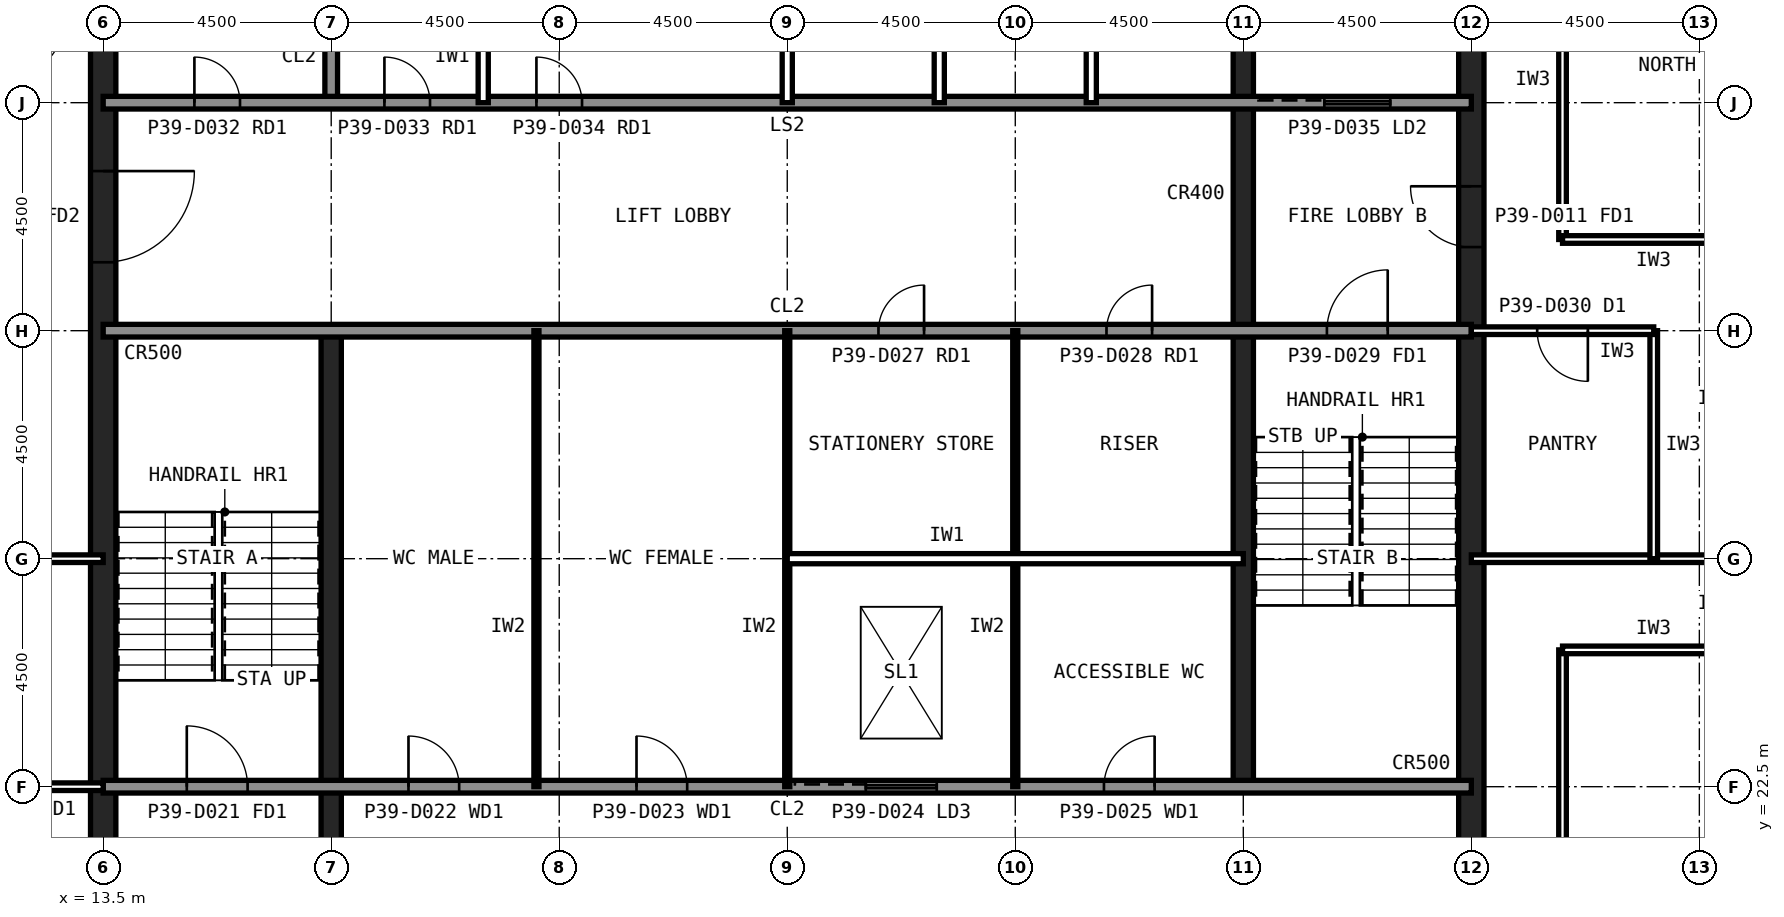
"""IFC4 building model, lengths in metres.
Left out: names, types, materials, properties, quantities, classifications, styles, units other than length and angle.
Written with IfcOpenShell. Run it as: python <this file> out.ifc"""

import sys

from ifc_helpers import new_model, si_unit, direction, frame, frame_2d, origin, place, context, subcontext, project, spatial, rectangle, extrude, element, fill, save


model = new_model("IFC4")
c1 = context("Model", 3, precision=1e-05, world=origin(), true_north=direction((0.0, 1.0)))
c2 = subcontext(c1, "Body", "Model", "MODEL_VIEW")
j1 = project(units=[si_unit("LENGTHUNIT", "METRE"), si_unit("PLANEANGLEUNIT", "RADIAN")], contexts=[c1])
p1 = place(None, origin())
s1 = spatial("IfcSite", under=j1, at=p1, CompositionType="ELEMENT")
p2 = place(p1, origin())
s2 = spatial("IfcBuilding", under=s1, at=p2, CompositionType="ELEMENT")
p3 = place(p2, frame((0.0, 0.0, 167.6)))
s3 = spatial("IfcBuildingStorey", under=s2, at=p3, CompositionType="ELEMENT", Elevation=167.6)
p4 = place(p3, frame((40.5, 13.5, 0.0), z_axis=(0.0, 0.0, 1.0), x_axis=(0.0, 1.0, 0.0)))
e1 = element("IfcWall", 1, at=p4, inside=s3, PredefinedType="SHEAR", context=c2, shape_type="SweptSolid", body=[
    extrude(rectangle(XDim=27.0, YDim=0.5, at=frame_2d((13.5, 0.0))), origin(), (0.0, 0.0, 1.0), 4.0),
])
p5 = place(p4, frame((5.85, 0.0, 0.0)))
e2 = element("IfcOpeningElement", 2, at=p5, cuts=e1, PredefinedType="OPENING", context=c2, shape_type="SweptSolid", body=[
    extrude(rectangle(XDim=1.8, YDim=2.1, at=frame_2d((0.9, 1.05))), frame((0.0, 0.26, 0.0), z_axis=(0.0, -1.0, 0.0), x_axis=(1.0, 0.0, 0.0)), (0.0, 0.0, 1.0), 0.52),
])
p6 = place(p4, frame((19.65, 0.0, 0.0)))
e3 = element("IfcOpeningElement", 3, at=p6, cuts=e1, PredefinedType="OPENING", context=c2, shape_type="SweptSolid", body=[
    extrude(rectangle(XDim=1.2, YDim=2.1, at=frame_2d((0.6, 1.05))), frame((0.0, 0.26, 0.0), z_axis=(0.0, -1.0, 0.0), x_axis=(1.0, 0.0, 0.0)), (0.0, 0.0, 1.0), 0.52),
])
p7 = place(p3, frame((13.5, 40.5, 0.0), z_axis=(0.0, 0.0, 1.0), x_axis=(0.0, -1.0, 0.0)))
e4 = element("IfcWall", 4, at=p7, inside=s3, PredefinedType="SHEAR", context=c2, shape_type="SweptSolid", body=[
    extrude(rectangle(XDim=27.0, YDim=0.5, at=frame_2d((13.5, 0.0))), origin(), (0.0, 0.0, 1.0), 4.0),
])
p8 = place(p7, frame((19.65, 0.0, 0.0)))
e5 = element("IfcOpeningElement", 5, at=p8, cuts=e4, PredefinedType="OPENING", context=c2, shape_type="SweptSolid", body=[
    extrude(rectangle(XDim=1.2, YDim=2.1, at=frame_2d((0.6, 1.05))), frame((0.0, 0.26, 0.0), z_axis=(0.0, -1.0, 0.0), x_axis=(1.0, 0.0, 0.0)), (0.0, 0.0, 1.0), 0.52),
])
p9 = place(p7, frame((5.85, 0.0, 0.0)))
e6 = element("IfcOpeningElement", 6, at=p9, cuts=e4, PredefinedType="OPENING", context=c2, shape_type="SweptSolid", body=[
    extrude(rectangle(XDim=1.8, YDim=2.1, at=frame_2d((0.9, 1.05))), frame((0.0, 0.26, 0.0), z_axis=(0.0, -1.0, 0.0), x_axis=(1.0, 0.0, 0.0)), (0.0, 0.0, 1.0), 0.52),
])
p10 = place(p3, frame((18.0, 13.5, 0.0), z_axis=(0.0, 0.0, 1.0), x_axis=(0.0, 1.0, 0.0)))
e7 = element("IfcWall", 7, at=p10, inside=s3, PredefinedType="SHEAR", context=c2, shape_type="SweptSolid", body=[
    extrude(rectangle(XDim=18.0, YDim=0.4, at=frame_2d((9.0, 0.0))), origin(), (0.0, 0.0, 1.0), 4.0),
])
p11 = place(p3, frame((18.0, 36.0, 0.0), z_axis=(0.0, 0.0, 1.0), x_axis=(0.0, 1.0, 0.0)))
e8 = element("IfcWall", 8, at=p11, inside=s3, PredefinedType="SOLIDWALL", context=c2, shape_type="SweptSolid", body=[
    extrude(rectangle(XDim=4.5, YDim=0.25, at=frame_2d((2.25, 0.0))), origin(), (0.0, 0.0, 1.0), 3.84),
])
p12 = place(p3, frame((36.0, 22.5, 0.0), z_axis=(0.0, 0.0, 1.0), x_axis=(0.0, 1.0, 0.0)))
e9 = element("IfcWall", 9, at=p12, inside=s3, PredefinedType="SHEAR", context=c2, shape_type="SweptSolid", body=[
    extrude(rectangle(XDim=18.0, YDim=0.4, at=frame_2d((9.0, 0.0))), origin(), (0.0, 0.0, 1.0), 4.0),
])
p13 = place(p3, frame((13.5, 36.0, 0.0), z_axis=(0.0, 0.0, 1.0), x_axis=(1.0, 0.0, 0.0)))
e10 = element("IfcWall", 10, at=p13, inside=s3, PredefinedType="SOLIDWALL", context=c2, shape_type="SweptSolid", body=[
    extrude(rectangle(XDim=27.0, YDim=0.25, at=frame_2d((13.5, 0.0))), origin(), (0.0, 0.0, 1.0), 3.84),
])
p14 = place(p13, frame((1.8, 0.0, 0.0)))
e11 = element("IfcOpeningElement", 11, at=p14, cuts=e10, PredefinedType="OPENING", context=c2, shape_type="SweptSolid", body=[
    extrude(rectangle(XDim=0.9, YDim=2.1, at=frame_2d((0.45, 1.05))), frame((0.0, 0.135, 0.0), z_axis=(0.0, -1.0, 0.0), x_axis=(1.0, 0.0, 0.0)), (0.0, 0.0, 1.0), 0.27),
])
p15 = place(p13, frame((5.55, 0.0, 0.0)))
e12 = element("IfcOpeningElement", 12, at=p15, cuts=e10, PredefinedType="OPENING", context=c2, shape_type="SweptSolid", body=[
    extrude(rectangle(XDim=0.9, YDim=2.1, at=frame_2d((0.45, 1.05))), frame((0.0, 0.135, 0.0), z_axis=(0.0, -1.0, 0.0), x_axis=(1.0, 0.0, 0.0)), (0.0, 0.0, 1.0), 0.27),
])
p16 = place(p13, frame((8.55, 0.0, 0.0)))
e13 = element("IfcOpeningElement", 13, at=p16, cuts=e10, PredefinedType="OPENING", context=c2, shape_type="SweptSolid", body=[
    extrude(rectangle(XDim=0.9, YDim=2.1, at=frame_2d((0.45, 1.05))), frame((0.0, 0.135, 0.0), z_axis=(0.0, -1.0, 0.0), x_axis=(1.0, 0.0, 0.0)), (0.0, 0.0, 1.0), 0.27),
])
p17 = place(p13, frame((24.1, 0.0, 0.0)))
e14 = element("IfcOpeningElement", 14, at=p17, cuts=e10, PredefinedType="OPENING", context=c2, shape_type="SweptSolid", body=[
    extrude(rectangle(XDim=1.3, YDim=2.2, at=frame_2d((0.65, 1.1))), frame((0.0, 0.135, 0.0), z_axis=(0.0, -1.0, 0.0), x_axis=(1.0, 0.0, 0.0)), (0.0, 0.0, 1.0), 0.27),
])
p18 = place(p3, frame((13.5, 22.5, 0.0), z_axis=(0.0, 0.0, 1.0), x_axis=(1.0, 0.0, 0.0)))
e15 = element("IfcWall", 15, at=p18, inside=s3, PredefinedType="SOLIDWALL", context=c2, shape_type="SweptSolid", body=[
    extrude(rectangle(XDim=27.0, YDim=0.25, at=frame_2d((13.5, 0.0))), origin(), (0.0, 0.0, 1.0), 3.84),
])
p19 = place(p18, frame((1.65, 0.0, 0.0)))
e16 = element("IfcOpeningElement", 16, at=p19, cuts=e15, PredefinedType="OPENING", context=c2, shape_type="SweptSolid", body=[
    extrude(rectangle(XDim=1.2, YDim=2.1, at=frame_2d((0.6, 1.05))), frame((0.0, 0.135, 0.0), z_axis=(0.0, -1.0, 0.0), x_axis=(1.0, 0.0, 0.0)), (0.0, 0.0, 1.0), 0.27),
])
p20 = place(p18, frame((6.025, 0.0, 0.0)))
e17 = element("IfcOpeningElement", 17, at=p20, cuts=e15, PredefinedType="OPENING", context=c2, shape_type="SweptSolid", body=[
    extrude(rectangle(XDim=1.0, YDim=2.1, at=frame_2d((0.5, 1.05))), frame((0.0, 0.135, 0.0), z_axis=(0.0, -1.0, 0.0), x_axis=(1.0, 0.0, 0.0)), (0.0, 0.0, 1.0), 0.27),
])
p21 = place(p18, frame((10.525, 0.0, 0.0)))
e18 = element("IfcOpeningElement", 18, at=p21, cuts=e15, PredefinedType="OPENING", context=c2, shape_type="SweptSolid", body=[
    extrude(rectangle(XDim=1.0, YDim=2.1, at=frame_2d((0.5, 1.05))), frame((0.0, 0.135, 0.0), z_axis=(0.0, -1.0, 0.0), x_axis=(1.0, 0.0, 0.0)), (0.0, 0.0, 1.0), 0.27),
])
p22 = place(p18, frame((19.75, 0.0, 0.0)))
e19 = element("IfcOpeningElement", 19, at=p22, cuts=e15, PredefinedType="OPENING", context=c2, shape_type="SweptSolid", body=[
    extrude(rectangle(XDim=1.0, YDim=2.1, at=frame_2d((0.5, 1.05))), frame((0.0, 0.135, 0.0), z_axis=(0.0, -1.0, 0.0), x_axis=(1.0, 0.0, 0.0)), (0.0, 0.0, 1.0), 0.27),
])
p23 = place(p18, frame((15.05, 0.0, 0.0)))
e20 = element("IfcOpeningElement", 20, at=p23, cuts=e15, PredefinedType="OPENING", context=c2, shape_type="SweptSolid", body=[
    extrude(rectangle(XDim=1.4, YDim=2.4, at=frame_2d((0.7, 1.2))), frame((0.0, 0.135, 0.0), z_axis=(0.0, -1.0, 0.0), x_axis=(1.0, 0.0, 0.0)), (0.0, 0.0, 1.0), 0.27),
])
p24 = place(p3, frame((13.5, 31.5, 0.0), z_axis=(0.0, 0.0, 1.0), x_axis=(1.0, 0.0, 0.0)))
e21 = element("IfcWall", 21, at=p24, inside=s3, PredefinedType="SOLIDWALL", context=c2, shape_type="SweptSolid", body=[
    extrude(rectangle(XDim=27.0, YDim=0.25, at=frame_2d((13.5, 0.0))), origin(), (0.0, 0.0, 1.0), 3.84),
])
p25 = place(p24, frame((24.15, 0.0, 0.0)))
e22 = element("IfcOpeningElement", 22, at=p25, cuts=e21, PredefinedType="OPENING", context=c2, shape_type="SweptSolid", body=[
    extrude(rectangle(XDim=1.2, YDim=2.1, at=frame_2d((0.6, 1.05))), frame((0.0, 0.135, 0.0), z_axis=(0.0, -1.0, 0.0), x_axis=(1.0, 0.0, 0.0)), (0.0, 0.0, 1.0), 0.27),
])
p26 = place(p24, frame((15.3, 0.0, 0.0)))
e23 = element("IfcOpeningElement", 23, at=p26, cuts=e21, PredefinedType="OPENING", context=c2, shape_type="SweptSolid", body=[
    extrude(rectangle(XDim=0.9, YDim=2.1, at=frame_2d((0.45, 1.05))), frame((0.0, 0.135, 0.0), z_axis=(0.0, -1.0, 0.0), x_axis=(1.0, 0.0, 0.0)), (0.0, 0.0, 1.0), 0.27),
])
p27 = place(p24, frame((19.8, 0.0, 0.0)))
e24 = element("IfcOpeningElement", 24, at=p27, cuts=e21, PredefinedType="OPENING", context=c2, shape_type="SweptSolid", body=[
    extrude(rectangle(XDim=0.9, YDim=2.1, at=frame_2d((0.45, 1.05))), frame((0.0, 0.135, 0.0), z_axis=(0.0, -1.0, 0.0), x_axis=(1.0, 0.0, 0.0)), (0.0, 0.0, 1.0), 0.27),
])
for number, where, z_axis, x_axis in (
    (25, (21.0, 36.0, 0.0), (0.0, 0.0, 1.0), (0.0, 1.0, 0.0)),
    (26, (27.0, 36.0, 0.0), (0.0, 0.0, 1.0), (0.0, 1.0, 0.0)),
    (27, (30.0, 36.0, 0.0), (0.0, 0.0, 1.0), (0.0, 1.0, 0.0)),
    (28, (33.0, 36.0, 0.0), (0.0, 0.0, 1.0), (0.0, 1.0, 0.0)),
):
    element("IfcWall", number, at=place(p3, frame(where, z_axis=z_axis, x_axis=x_axis)), inside=s3, PredefinedType="PARTITIONING", context=c2, shape_type="SweptSolid", body=[
        extrude(rectangle(XDim=4.5, YDim=0.2, at=frame_2d((2.25, 0.0))), origin(), (0.0, 0.0, 1.0), 3.84),
    ])
for number, where, z_axis, x_axis in (
    (29, (22.05, 22.5, 0.0), (0.0, 0.0, 1.0), (0.0, 1.0, 0.0)),
    (30, (27.0, 22.5, 0.0), (0.0, 0.0, 1.0), (0.0, 1.0, 0.0)),
    (31, (31.5, 22.5, 0.0), (0.0, 0.0, 1.0), (0.0, 1.0, 0.0)),
):
    element("IfcWall", number, at=place(p3, frame(where, z_axis=z_axis, x_axis=x_axis)), inside=s3, PredefinedType="PLUMBINGWALL", context=c2, shape_type="SweptSolid", body=[
        extrude(rectangle(XDim=9.0, YDim=0.1, at=frame_2d((4.5, 0.0))), origin(), (0.0, 0.0, 1.0), 3.84),
    ])
p28 = place(p3, frame((27.0, 27.0, 0.0), z_axis=(0.0, 0.0, 1.0), x_axis=(1.0, 0.0, 0.0)))
e32 = element("IfcWall", 32, at=p28, inside=s3, PredefinedType="PARTITIONING", context=c2, shape_type="SweptSolid", body=[
    extrude(rectangle(XDim=9.0, YDim=0.2, at=frame_2d((4.5, 0.0))), origin(), (0.0, 0.0, 1.0), 3.84),
])
for number, where, z_axis, x_axis in (
    (33, (0.36, 27.0, 0.0), (0.0, 0.0, 1.0), (1.0, 0.0, 0.0)),
    (34, (40.5, 27.0, 0.0), (0.0, 0.0, 1.0), (1.0, 0.0, 0.0)),
):
    element("IfcWall", number, at=place(p3, frame(where, z_axis=z_axis, x_axis=x_axis)), inside=s3, PredefinedType="PARTITIONING", context=c2, shape_type="SweptSolid", body=[
        extrude(rectangle(XDim=13.14, YDim=0.15, at=frame_2d((6.57, 0.0))), origin(), (0.0, 0.0, 1.0), 2.989),
    ])
p29 = place(p3, frame((42.3, 33.3, 0.0), z_axis=(0.0, 0.0, 1.0), x_axis=(0.0, 1.0, 0.0)))
e35 = element("IfcWall", 35, at=p29, inside=s3, PredefinedType="PARTITIONING", context=c2, shape_type="SweptSolid", body=[
    extrude(rectangle(XDim=9.0, YDim=0.15, at=frame_2d((4.5, 0.0))), origin(), (0.0, 0.0, 1.0), 3.84),
])
p30 = place(p29, frame((4.0, 0.0, 0.0)))
e36 = element("IfcOpeningElement", 36, at=p30, cuts=e35, PredefinedType="OPENING", context=c2, shape_type="SweptSolid", body=[
    extrude(rectangle(XDim=1.0, YDim=2.1, at=frame_2d((0.5, 1.05))), frame((0.0, 0.085, 0.0), z_axis=(0.0, -1.0, 0.0), x_axis=(1.0, 0.0, 0.0)), (0.0, 0.0, 1.0), 0.17),
])
p31 = place(p3, frame((45.9, 33.3, 0.0), z_axis=(0.0, 0.0, 1.0), x_axis=(-1.0, 0.0, 0.0)))
e37 = element("IfcWall", 37, at=p31, inside=s3, PredefinedType="PARTITIONING", context=c2, shape_type="SweptSolid", body=[
    extrude(rectangle(XDim=3.6, YDim=0.15, at=frame_2d((1.8, 0.0))), origin(), (0.0, 0.0, 1.0), 3.84),
])
p32 = place(p3, frame((42.3, 4.95, 0.0), z_axis=(0.0, 0.0, 1.0), x_axis=(0.0, 1.0, 0.0)))
e38 = element("IfcWall", 38, at=p32, inside=s3, PredefinedType="PARTITIONING", context=c2, shape_type="SweptSolid", body=[
    extrude(rectangle(XDim=20.25, YDim=0.15, at=frame_2d((10.125, 0.0))), origin(), (0.0, 0.0, 1.0), 3.84),
])
p33 = place(p32, frame((9.625, 0.0, 0.0)))
e39 = element("IfcOpeningElement", 39, at=p33, cuts=e38, PredefinedType="OPENING", context=c2, shape_type="SweptSolid", body=[
    extrude(rectangle(XDim=1.0, YDim=2.1, at=frame_2d((0.5, 1.05))), frame((0.0, 0.085, 0.0), z_axis=(0.0, -1.0, 0.0), x_axis=(1.0, 0.0, 0.0)), (0.0, 0.0, 1.0), 0.17),
])
p34 = place(p3, frame((42.3, 25.2, 0.0), z_axis=(0.0, 0.0, 1.0), x_axis=(1.0, 0.0, 0.0)))
e40 = element("IfcWall", 40, at=p34, inside=s3, PredefinedType="PARTITIONING", context=c2, shape_type="SweptSolid", body=[
    extrude(rectangle(XDim=3.6, YDim=0.15, at=frame_2d((1.8, 0.0))), origin(), (0.0, 0.0, 1.0), 3.84),
])
p35 = place(p3, frame((44.1, 27.0, 0.0), z_axis=(0.0, 0.0, 1.0), x_axis=(0.0, 1.0, 0.0)))
e41 = element("IfcWall", 41, at=p35, inside=s3, PredefinedType="PARTITIONING", context=c2, shape_type="SweptSolid", body=[
    extrude(rectangle(XDim=4.5, YDim=0.15, at=frame_2d((2.25, 0.0))), origin(), (0.0, 0.0, 1.0), 3.84),
])
p36 = place(p3, frame((44.1, 31.5, 0.0), z_axis=(0.0, 0.0, 1.0), x_axis=(-1.0, 0.0, 0.0)))
e42 = element("IfcWall", 42, at=p36, inside=s3, PredefinedType="PARTITIONING", context=c2, shape_type="SweptSolid", body=[
    extrude(rectangle(XDim=3.6, YDim=0.15, at=frame_2d((1.8, 0.0))), origin(), (0.0, 0.0, 1.0), 2.989),
])
p37 = place(p36, frame((1.3, 0.0, 0.0)))
e43 = element("IfcOpeningElement", 43, at=p37, cuts=e42, PredefinedType="OPENING", context=c2, shape_type="SweptSolid", body=[
    extrude(rectangle(XDim=1.0, YDim=2.1, at=frame_2d((0.5, 1.05))), frame((0.0, 0.085, 0.0), z_axis=(0.0, -1.0, 0.0), x_axis=(1.0, 0.0, 0.0)), (0.0, 0.0, 1.0), 0.17),
])
p38 = place(p3, frame((9.9, 22.5, 0.0), z_axis=(0.0, 0.0, 1.0), x_axis=(1.0, 0.0, 0.0)))
e44 = element("IfcWall", 44, at=p38, inside=s3, PredefinedType="PARTITIONING", context=c2, shape_type="SweptSolid", body=[
    extrude(rectangle(XDim=3.6, YDim=0.15, at=frame_2d((1.8, 0.0))), origin(), (0.0, 0.0, 1.0), 2.989),
])
p39 = place(p38, frame((1.3, 0.0, 0.0)))
e45 = element("IfcOpeningElement", 45, at=p39, cuts=e44, PredefinedType="OPENING", context=c2, shape_type="SweptSolid", body=[
    extrude(rectangle(XDim=1.0, YDim=2.1, at=frame_2d((0.5, 1.05))), frame((0.0, 0.085, 0.0), z_axis=(0.0, -1.0, 0.0), x_axis=(1.0, 0.0, 0.0)), (0.0, 0.0, 1.0), 0.17),
])
p40 = place(p9, origin())
e46 = element("IfcDoor", 46, at=p40, inside=s3, OperationType="SINGLE_SWING_LEFT", PredefinedType="DOOR", context=c2, shape_type="SweptSolid", body=[
    extrude(rectangle(XDim=1.8, YDim=2.1, at=frame_2d((0.9, 1.05))), frame((0.0, 0.025, 0.0), z_axis=(0.0, -1.0, 0.0), x_axis=(1.0, 0.0, 0.0)), (0.0, 0.0, 1.0), 0.05),
])
fill(e6, e46)
p41 = place(p6, origin())
e47 = element("IfcDoor", 47, at=p41, inside=s3, OperationType="SINGLE_SWING_RIGHT", PredefinedType="DOOR", context=c2, shape_type="SweptSolid", body=[
    extrude(rectangle(XDim=1.2, YDim=2.1, at=frame_2d((0.6, 1.05))), frame((0.0, 0.025, 0.0), z_axis=(0.0, -1.0, 0.0), x_axis=(1.0, 0.0, 0.0)), (0.0, 0.0, 1.0), 0.05),
])
fill(e3, e47)
p42 = place(p19, origin())
e48 = element("IfcDoor", 48, at=p42, inside=s3, OperationType="SINGLE_SWING_LEFT", PredefinedType="DOOR", context=c2, shape_type="SweptSolid", body=[
    extrude(rectangle(XDim=1.2, YDim=2.1, at=frame_2d((0.6, 1.05))), frame((0.0, 0.025, 0.0), z_axis=(0.0, -1.0, 0.0), x_axis=(1.0, 0.0, 0.0)), (0.0, 0.0, 1.0), 0.05),
])
fill(e16, e48)
p43 = place(p25, origin())
e49 = element("IfcDoor", 49, at=p43, inside=s3, OperationType="SINGLE_SWING_RIGHT", PredefinedType="DOOR", context=c2, shape_type="SweptSolid", body=[
    extrude(rectangle(XDim=1.2, YDim=2.1, at=frame_2d((0.6, 1.05))), frame((0.0, 0.025, 0.0), z_axis=(0.0, -1.0, 0.0), x_axis=(1.0, 0.0, 0.0)), (0.0, 0.0, 1.0), 0.05),
])
fill(e22, e49)
p44 = place(p20, origin())
e50 = element("IfcDoor", 50, at=p44, inside=s3, OperationType="SINGLE_SWING_LEFT", PredefinedType="DOOR", context=c2, shape_type="SweptSolid", body=[
    extrude(rectangle(XDim=1.0, YDim=2.1, at=frame_2d((0.5, 1.05))), frame((0.0, 0.025, 0.0), z_axis=(0.0, -1.0, 0.0), x_axis=(1.0, 0.0, 0.0)), (0.0, 0.0, 1.0), 0.05),
])
fill(e17, e50)
p45 = place(p21, origin())
e51 = element("IfcDoor", 51, at=p45, inside=s3, OperationType="SINGLE_SWING_LEFT", PredefinedType="DOOR", context=c2, shape_type="SweptSolid", body=[
    extrude(rectangle(XDim=1.0, YDim=2.1, at=frame_2d((0.5, 1.05))), frame((0.0, 0.025, 0.0), z_axis=(0.0, -1.0, 0.0), x_axis=(1.0, 0.0, 0.0)), (0.0, 0.0, 1.0), 0.05),
])
fill(e18, e51)
p46 = place(p22, origin())
e52 = element("IfcDoor", 52, at=p46, inside=s3, OperationType="SINGLE_SWING_RIGHT", PredefinedType="DOOR", context=c2, shape_type="SweptSolid", body=[
    extrude(rectangle(XDim=1.0, YDim=2.1, at=frame_2d((0.5, 1.05))), frame((0.0, 0.025, 0.0), z_axis=(0.0, -1.0, 0.0), x_axis=(1.0, 0.0, 0.0)), (0.0, 0.0, 1.0), 0.05),
])
fill(e19, e52)
p47 = place(p26, origin())
e53 = element("IfcDoor", 53, at=p47, inside=s3, OperationType="SINGLE_SWING_RIGHT", PredefinedType="DOOR", context=c2, shape_type="SweptSolid", body=[
    extrude(rectangle(XDim=0.9, YDim=2.1, at=frame_2d((0.45, 1.05))), frame((0.0, 0.025, 0.0), z_axis=(0.0, -1.0, 0.0), x_axis=(1.0, 0.0, 0.0)), (0.0, 0.0, 1.0), 0.05),
])
fill(e23, e53)
p48 = place(p27, origin())
e54 = element("IfcDoor", 54, at=p48, inside=s3, OperationType="SINGLE_SWING_RIGHT", PredefinedType="DOOR", context=c2, shape_type="SweptSolid", body=[
    extrude(rectangle(XDim=0.9, YDim=2.1, at=frame_2d((0.45, 1.05))), frame((0.0, 0.025, 0.0), z_axis=(0.0, -1.0, 0.0), x_axis=(1.0, 0.0, 0.0)), (0.0, 0.0, 1.0), 0.05),
])
fill(e24, e54)
p49 = place(p14, origin())
e55 = element("IfcDoor", 55, at=p49, inside=s3, OperationType="SINGLE_SWING_LEFT", PredefinedType="DOOR", context=c2, shape_type="SweptSolid", body=[
    extrude(rectangle(XDim=0.9, YDim=2.1, at=frame_2d((0.45, 1.05))), frame((0.0, 0.025, 0.0), z_axis=(0.0, -1.0, 0.0), x_axis=(1.0, 0.0, 0.0)), (0.0, 0.0, 1.0), 0.05),
])
fill(e11, e55)
p50 = place(p15, origin())
e56 = element("IfcDoor", 56, at=p50, inside=s3, OperationType="SINGLE_SWING_LEFT", PredefinedType="DOOR", context=c2, shape_type="SweptSolid", body=[
    extrude(rectangle(XDim=0.9, YDim=2.1, at=frame_2d((0.45, 1.05))), frame((0.0, 0.025, 0.0), z_axis=(0.0, -1.0, 0.0), x_axis=(1.0, 0.0, 0.0)), (0.0, 0.0, 1.0), 0.05),
])
fill(e12, e56)
p51 = place(p16, origin())
e57 = element("IfcDoor", 57, at=p51, inside=s3, OperationType="SINGLE_SWING_LEFT", PredefinedType="DOOR", context=c2, shape_type="SweptSolid", body=[
    extrude(rectangle(XDim=0.9, YDim=2.1, at=frame_2d((0.45, 1.05))), frame((0.0, 0.025, 0.0), z_axis=(0.0, -1.0, 0.0), x_axis=(1.0, 0.0, 0.0)), (0.0, 0.0, 1.0), 0.05),
])
fill(e13, e57)
p52 = place(p17, origin())
e58 = element("IfcDoor", 58, at=p52, inside=s3, OperationType="SLIDING_TO_LEFT", PredefinedType="DOOR", context=c2, shape_type="SweptSolid", body=[
    extrude(rectangle(XDim=1.3, YDim=2.2, at=frame_2d((0.65, 1.1))), frame((0.0, 0.025, 0.0), z_axis=(0.0, -1.0, 0.0), x_axis=(1.0, 0.0, 0.0)), (0.0, 0.0, 1.0), 0.05),
])
fill(e14, e58)
p53 = place(p23, origin())
e59 = element("IfcDoor", 59, at=p53, inside=s3, OperationType="SLIDING_TO_LEFT", PredefinedType="DOOR", context=c2, shape_type="SweptSolid", body=[
    extrude(rectangle(XDim=1.4, YDim=2.4, at=frame_2d((0.7, 1.2))), frame((0.0, 0.025, 0.0), z_axis=(0.0, -1.0, 0.0), x_axis=(1.0, 0.0, 0.0)), (0.0, 0.0, 1.0), 0.05),
])
fill(e20, e59)
p54 = place(p37, origin())
e60 = element("IfcDoor", 60, at=p54, inside=s3, OperationType="SINGLE_SWING_LEFT", PredefinedType="DOOR", context=c2, shape_type="SweptSolid", body=[
    extrude(rectangle(XDim=1.0, YDim=2.1, at=frame_2d((0.5, 1.05))), frame((0.0, 0.025, 0.0), z_axis=(0.0, -1.0, 0.0), x_axis=(1.0, 0.0, 0.0)), (0.0, 0.0, 1.0), 0.05),
])
fill(e43, e60)
save(model, sys.argv[1])
